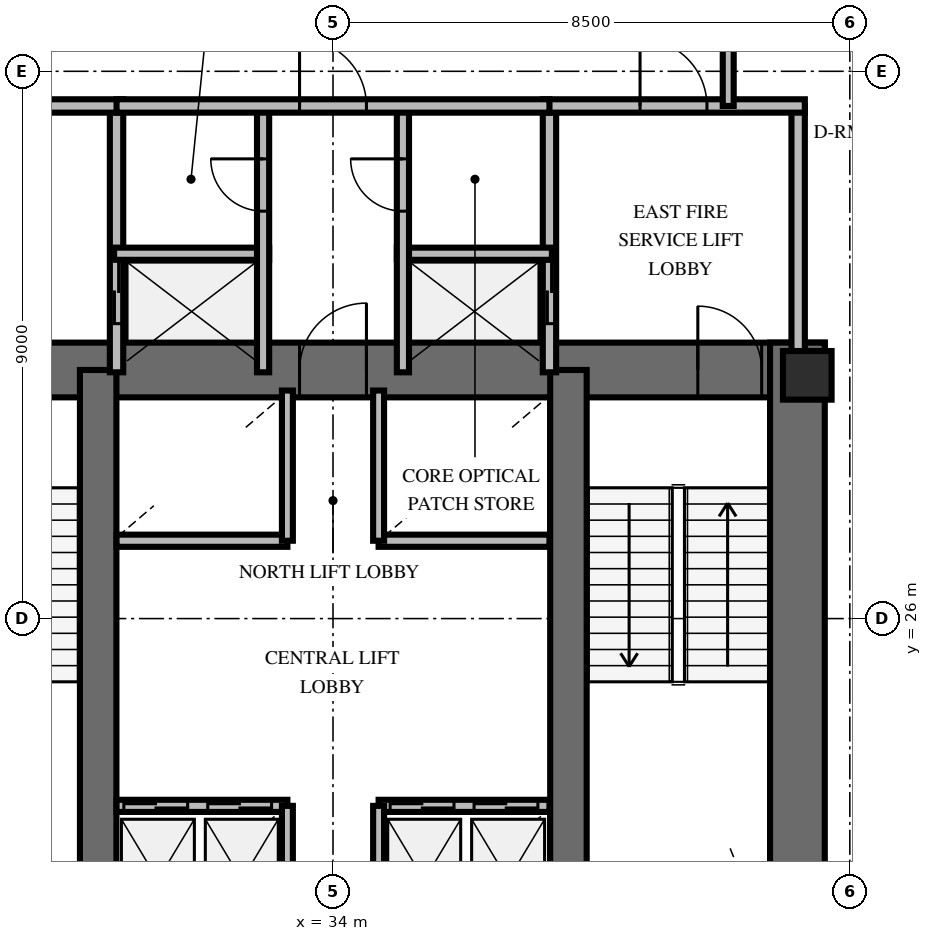
"""IFC4 building model, lengths in metres.
Left out: names, types, materials, properties, quantities, classifications, styles, units other than length and angle.
Written with IfcOpenShell. Run it as: python <this file> out.ifc"""

import sys

from ifc_helpers import new_model, si_unit, direction, frame, frame_2d, origin, origin_2d, place, context, subcontext, project, spatial, rectangle, extrude, element, fill, save


model = new_model("IFC4")
c1 = context("Model", 3, precision=1e-05, world=origin(), true_north=direction((0.0, 1.0)))
c2 = subcontext(c1, "Body", "Model", "MODEL_VIEW")
j1 = project(units=[si_unit("LENGTHUNIT", "METRE"), si_unit("PLANEANGLEUNIT", "RADIAN")], contexts=[c1])
p1 = place(None, origin())
s1 = spatial("IfcSite", under=j1, at=p1, CompositionType="ELEMENT")
p2 = place(p1, origin())
s2 = spatial("IfcBuilding", under=s1, at=p2, CompositionType="ELEMENT")
p3 = place(p2, frame((0.0, 0.0, 80.4)))
s3 = spatial("IfcBuildingStorey", under=s2, at=p3, CompositionType="ELEMENT", Elevation=80.4)
p4 = place(p3, frame((25.922, 30.088, 0.0), z_axis=(0.0, 0.0, 1.0), x_axis=(1.0, 0.0, 0.0)))
e1 = element("IfcWall", 1, at=p4, inside=s3, PredefinedType="SHEAR", context=c2, shape_type="SweptSolid", body=[
    extrude(rectangle(XDim=16.166, YDim=0.9, at=frame_2d((8.083, 0.0))), origin(), (0.0, 0.0, 1.0), 4.2),
])
p5 = place(p4, frame((1.028, 0.0, 0.0)))
e2 = element("IfcOpeningElement", 2, at=p5, cuts=e1, PredefinedType="OPENING", context=c2, shape_type="SweptSolid", body=[
    extrude(rectangle(XDim=1.05, YDim=2.15, at=frame_2d((0.525, 1.075))), frame((0.0, 0.46, 0.0), z_axis=(0.0, -1.0, 0.0), x_axis=(1.0, 0.0, 0.0)), (0.0, 0.0, 1.0), 0.92),
])
p6 = place(p4, frame((14.078, 0.0, 0.0)))
e3 = element("IfcOpeningElement", 3, at=p6, cuts=e1, PredefinedType="OPENING", context=c2, shape_type="SweptSolid", body=[
    extrude(rectangle(XDim=1.05, YDim=2.15, at=frame_2d((0.525, 1.075))), frame((0.0, 0.46, 0.0), z_axis=(0.0, -1.0, 0.0), x_axis=(1.0, 0.0, 0.0)), (0.0, 0.0, 1.0), 0.92),
])
p7 = place(p4, frame((7.528, 0.0, 0.0)))
e4 = element("IfcOpeningElement", 4, at=p7, cuts=e1, PredefinedType="OPENING", context=c2, shape_type="SweptSolid", body=[
    extrude(rectangle(XDim=1.1, YDim=2.15, at=frame_2d((0.55, 1.075))), frame((0.0, 0.46, 0.0), z_axis=(0.0, -1.0, 0.0), x_axis=(1.0, 0.0, 0.0)), (0.0, 0.0, 1.0), 0.92),
])
p8 = place(p3, frame((41.638, 19.662, 0.0), z_axis=(0.0, 0.0, 1.0), x_axis=(0.0, 1.0, 0.0)))
e5 = element("IfcWall", 5, at=p8, inside=s3, PredefinedType="SHEAR", context=c2, shape_type="SweptSolid", body=[
    extrude(rectangle(XDim=10.876, YDim=0.9, at=frame_2d((5.438, 0.0))), origin(), (0.0, 0.0, 1.0), 4.2),
])
for number, where, z_axis, x_axis in (
    (6, (30.138, 20.112, 0.0), (0.0, 0.0, 1.0), (0.0, 1.0, 0.0)),
    (7, (37.872, 20.112, 0.0), (0.0, 0.0, 1.0), (0.0, 1.0, 0.0)),
):
    element("IfcWall", number, at=place(p3, frame(where, z_axis=z_axis, x_axis=x_axis)), inside=s3, PredefinedType="SHEAR", context=c2, shape_type="SweptSolid", body=[
        extrude(rectangle(XDim=9.976, YDim=0.6, at=frame_2d((4.988, 0.0))), origin(), (0.0, 0.0, 1.0), 4.2),
    ])
p9 = place(p3, frame((41.8, 30.0, 0.0), z_axis=(0.0, 0.0, 1.0), x_axis=(1.0, 0.0, 0.0)))
e8 = element("IfcColumn", 8, at=p9, inside=s3, PredefinedType="PILASTER", context=c2, shape_type="SweptSolid", body=[
    extrude(rectangle(XDim=0.8, YDim=0.8, at=origin_2d()), origin(), (0.0, 0.0, 1.0), 4.2),
])
p10 = place(p3, frame((30.44, 30.05, 0.0), z_axis=(0.0, 0.0, 1.0), x_axis=(0.0, 1.0, 0.0)))
e9 = element("IfcWall", 9, at=p10, inside=s3, PredefinedType="SOLIDWALL", context=c2, shape_type="SweptSolid", body=[
    extrude(rectangle(XDim=4.38, YDim=0.22, at=frame_2d((2.19, 0.0))), origin(), (0.0, 0.0, 1.0), 3.0),
])
p11 = place(p10, frame((0.8, 0.0, 0.0)))
e10 = element("IfcOpeningElement", 10, at=p11, cuts=e9, PredefinedType="OPENING", context=c2, shape_type="SweptSolid", body=[
    extrude(rectangle(XDim=1.05, YDim=2.1, at=frame_2d((0.525, 1.05))), frame((0.0, 0.12, 0.0), z_axis=(0.0, -1.0, 0.0), x_axis=(1.0, 0.0, 0.0)), (0.0, 0.0, 1.0), 0.24),
])
p12 = place(p3, frame((26.24, 34.43, 0.0), z_axis=(0.0, 0.0, 1.0), x_axis=(1.0, 0.0, 0.0)))
e11 = element("IfcWall", 11, at=p12, inside=s3, PredefinedType="SOLIDWALL", context=c2, shape_type="SweptSolid", body=[
    extrude(rectangle(XDim=4.31, YDim=0.22, at=frame_2d((2.155, 0.0))), origin(), (0.0, 0.0, 1.0), 3.0),
])
p13 = place(p12, frame((1.6, 0.0, 0.0)))
e12 = element("IfcOpeningElement", 12, at=p13, cuts=e11, PredefinedType="OPENING", context=c2, shape_type="SweptSolid", body=[
    extrude(rectangle(XDim=1.1, YDim=2.15, at=frame_2d((0.55, 1.075))), frame((0.0, 0.12, 0.0), z_axis=(0.0, -1.0, 0.0), x_axis=(1.0, 0.0, 0.0)), (0.0, 0.0, 1.0), 0.24),
])
p14 = place(p3, frame((30.4, 32.0, 0.0), z_axis=(0.0, 0.0, 1.0), x_axis=(1.0, 0.0, 0.0)))
e13 = element("IfcWall", 13, at=p14, inside=s3, PredefinedType="SOLIDWALL", context=c2, shape_type="SweptSolid", body=[
    extrude(rectangle(XDim=2.55, YDim=0.2, at=frame_2d((1.275, 0.0))), origin(), (0.0, 0.0, 1.0), 3.0),
])
p15 = place(p3, frame((32.85, 30.05, 0.0), z_axis=(0.0, 0.0, 1.0), x_axis=(0.0, 1.0, 0.0)))
e14 = element("IfcWall", 14, at=p15, inside=s3, PredefinedType="SOLIDWALL", context=c2, shape_type="SweptSolid", body=[
    extrude(rectangle(XDim=4.38, YDim=0.2, at=frame_2d((2.19, 0.0))), origin(), (0.0, 0.0, 1.0), 3.0),
])
p16 = place(p15, frame((2.65, 0.0, 0.0)))
e15 = element("IfcOpeningElement", 15, at=p16, cuts=e14, PredefinedType="OPENING", context=c2, shape_type="SweptSolid", body=[
    extrude(rectangle(XDim=0.86, YDim=2.05, at=frame_2d((0.43, 1.025))), frame((0.0, 0.11, 0.0), z_axis=(0.0, -1.0, 0.0), x_axis=(1.0, 0.0, 0.0)), (0.0, 0.0, 1.0), 0.22),
])
p17 = place(p3, frame((37.56, 30.05, 0.0), z_axis=(0.0, 0.0, 1.0), x_axis=(0.0, 1.0, 0.0)))
e16 = element("IfcWall", 16, at=p17, inside=s3, PredefinedType="SOLIDWALL", context=c2, shape_type="SweptSolid", body=[
    extrude(rectangle(XDim=4.38, YDim=0.22, at=frame_2d((2.19, 0.0))), origin(), (0.0, 0.0, 1.0), 3.0),
])
p18 = place(p17, frame((0.8, 0.0, 0.0)))
e17 = element("IfcOpeningElement", 17, at=p18, cuts=e16, PredefinedType="OPENING", context=c2, shape_type="SweptSolid", body=[
    extrude(rectangle(XDim=1.05, YDim=2.1, at=frame_2d((0.525, 1.05))), frame((0.0, 0.12, 0.0), z_axis=(0.0, -1.0, 0.0), x_axis=(1.0, 0.0, 0.0)), (0.0, 0.0, 1.0), 0.24),
])
p19 = place(p3, frame((41.65, 30.05, 0.0), z_axis=(0.0, 0.0, 1.0), x_axis=(0.0, 1.0, 0.0)))
e18 = element("IfcWall", 18, at=p19, inside=s3, PredefinedType="SOLIDWALL", context=c2, shape_type="SweptSolid", body=[
    extrude(rectangle(XDim=4.38, YDim=0.22, at=frame_2d((2.19, 0.0))), origin(), (0.0, 0.0, 1.0), 3.0),
])
p20 = place(p3, frame((37.45, 34.43, 0.0), z_axis=(0.0, 0.0, 1.0), x_axis=(1.0, 0.0, 0.0)))
e19 = element("IfcWall", 19, at=p20, inside=s3, PredefinedType="SOLIDWALL", context=c2, shape_type="SweptSolid", body=[
    extrude(rectangle(XDim=4.31, YDim=0.22, at=frame_2d((2.155, 0.0))), origin(), (0.0, 0.0, 1.0), 3.0),
])
p21 = place(p20, frame((1.6, 0.0, 0.0)))
e20 = element("IfcOpeningElement", 20, at=p21, cuts=e19, PredefinedType="OPENING", context=c2, shape_type="SweptSolid", body=[
    extrude(rectangle(XDim=1.1, YDim=2.15, at=frame_2d((0.55, 1.075))), frame((0.0, 0.12, 0.0), z_axis=(0.0, -1.0, 0.0), x_axis=(1.0, 0.0, 0.0)), (0.0, 0.0, 1.0), 0.24),
])
p22 = place(p3, frame((35.05, 32.0, 0.0), z_axis=(0.0, 0.0, 1.0), x_axis=(1.0, 0.0, 0.0)))
e21 = element("IfcWall", 21, at=p22, inside=s3, PredefinedType="SOLIDWALL", context=c2, shape_type="SweptSolid", body=[
    extrude(rectangle(XDim=2.55, YDim=0.2, at=frame_2d((1.275, 0.0))), origin(), (0.0, 0.0, 1.0), 3.0),
])
p23 = place(p3, frame((35.15, 30.05, 0.0), z_axis=(0.0, 0.0, 1.0), x_axis=(0.0, 1.0, 0.0)))
e22 = element("IfcWall", 22, at=p23, inside=s3, PredefinedType="SOLIDWALL", context=c2, shape_type="SweptSolid", body=[
    extrude(rectangle(XDim=4.38, YDim=0.2, at=frame_2d((2.19, 0.0))), origin(), (0.0, 0.0, 1.0), 3.0),
])
p24 = place(p23, frame((2.65, 0.0, 0.0)))
e23 = element("IfcOpeningElement", 23, at=p24, cuts=e22, PredefinedType="OPENING", context=c2, shape_type="SweptSolid", body=[
    extrude(rectangle(XDim=0.86, YDim=2.05, at=frame_2d((0.43, 1.025))), frame((0.0, 0.11, 0.0), z_axis=(0.0, -1.0, 0.0), x_axis=(1.0, 0.0, 0.0)), (0.0, 0.0, 1.0), 0.22),
])
p25 = place(p3, frame((30.44, 34.43, 0.0), z_axis=(0.0, 0.0, 1.0), x_axis=(1.0, 0.0, 0.0)))
e24 = element("IfcWall", 24, at=p25, inside=s3, PredefinedType="SOLIDWALL", context=c2, shape_type="SweptSolid", body=[
    extrude(rectangle(XDim=7.12, YDim=0.22, at=frame_2d((3.56, 0.0))), origin(), (0.0, 0.0, 1.0), 3.0),
])
p26 = place(p25, frame((3.01, 0.0, 0.0)))
e25 = element("IfcOpeningElement", 25, at=p26, cuts=e24, PredefinedType="OPENING", context=c2, shape_type="SweptSolid", body=[
    extrude(rectangle(XDim=1.1, YDim=2.15, at=frame_2d((0.55, 1.075))), frame((0.0, 0.12, 0.0), z_axis=(0.0, -1.0, 0.0), x_axis=(1.0, 0.0, 0.0)), (0.0, 0.0, 1.0), 0.24),
])
p27 = place(p3, frame((30.44, 22.92, 0.0), z_axis=(0.0, 0.0, 1.0), x_axis=(1.0, 0.0, 0.0)))
e26 = element("IfcWall", 26, at=p27, inside=s3, PredefinedType="SOLIDWALL", context=c2, shape_type="SweptSolid", body=[
    extrude(rectangle(XDim=2.81, YDim=0.2, at=frame_2d((1.405, 0.0))), origin(), (0.0, 0.0, 1.0), 3.0),
])
p28 = place(p27, frame((0.12, 0.0, 0.0)))
e27 = element("IfcOpeningElement", 27, at=p28, cuts=e26, PredefinedType="OPENING", context=c2, shape_type="SweptSolid", body=[
    extrude(rectangle(XDim=1.05, YDim=2.1, at=frame_2d((0.525, 1.05))), frame((0.0, 0.11, 0.0), z_axis=(0.0, -1.0, 0.0), x_axis=(1.0, 0.0, 0.0)), (0.0, 0.0, 1.0), 0.22),
])
p29 = place(p27, frame((1.5, 0.0, 0.0)))
e28 = element("IfcOpeningElement", 28, at=p29, cuts=e26, PredefinedType="OPENING", context=c2, shape_type="SweptSolid", body=[
    extrude(rectangle(XDim=1.05, YDim=2.1, at=frame_2d((0.525, 1.05))), frame((0.0, 0.11, 0.0), z_axis=(0.0, -1.0, 0.0), x_axis=(1.0, 0.0, 0.0)), (0.0, 0.0, 1.0), 0.22),
])
p30 = place(p3, frame((33.25, 20.5, 0.0), z_axis=(0.0, 0.0, 1.0), x_axis=(0.0, 1.0, 0.0)))
e29 = element("IfcWall", 29, at=p30, inside=s3, PredefinedType="SOLIDWALL", context=c2, shape_type="SweptSolid", body=[
    extrude(rectangle(XDim=2.42, YDim=0.18, at=frame_2d((1.21, 0.0))), origin(), (0.0, 0.0, 1.0), 3.0),
])
p31 = place(p3, frame((34.75, 22.92, 0.0), z_axis=(0.0, 0.0, 1.0), x_axis=(1.0, 0.0, 0.0)))
e30 = element("IfcWall", 30, at=p31, inside=s3, PredefinedType="SOLIDWALL", context=c2, shape_type="SweptSolid", body=[
    extrude(rectangle(XDim=2.81, YDim=0.2, at=frame_2d((1.405, 0.0))), origin(), (0.0, 0.0, 1.0), 3.0),
])
p32 = place(p31, frame((0.19, 0.0, 0.0)))
e31 = element("IfcOpeningElement", 31, at=p32, cuts=e30, PredefinedType="OPENING", context=c2, shape_type="SweptSolid", body=[
    extrude(rectangle(XDim=1.05, YDim=2.1, at=frame_2d((0.525, 1.05))), frame((0.0, 0.11, 0.0), z_axis=(0.0, -1.0, 0.0), x_axis=(1.0, 0.0, 0.0)), (0.0, 0.0, 1.0), 0.22),
])
p33 = place(p31, frame((1.57, 0.0, 0.0)))
e32 = element("IfcOpeningElement", 32, at=p33, cuts=e30, PredefinedType="OPENING", context=c2, shape_type="SweptSolid", body=[
    extrude(rectangle(XDim=1.05, YDim=2.1, at=frame_2d((0.525, 1.05))), frame((0.0, 0.11, 0.0), z_axis=(0.0, -1.0, 0.0), x_axis=(1.0, 0.0, 0.0)), (0.0, 0.0, 1.0), 0.22),
])
p34 = place(p3, frame((34.75, 20.5, 0.0), z_axis=(0.0, 0.0, 1.0), x_axis=(0.0, 1.0, 0.0)))
e33 = element("IfcWall", 33, at=p34, inside=s3, PredefinedType="SOLIDWALL", context=c2, shape_type="SweptSolid", body=[
    extrude(rectangle(XDim=2.42, YDim=0.18, at=frame_2d((1.21, 0.0))), origin(), (0.0, 0.0, 1.0), 3.0),
])
p35 = place(p3, frame((30.44, 27.28, 0.0), z_axis=(0.0, 0.0, 1.0), x_axis=(1.0, 0.0, 0.0)))
e34 = element("IfcWall", 34, at=p35, inside=s3, PredefinedType="SOLIDWALL", context=c2, shape_type="SweptSolid", body=[
    extrude(rectangle(XDim=2.81, YDim=0.2, at=frame_2d((1.405, 0.0))), origin(), (0.0, 0.0, 1.0), 3.0),
])
p36 = place(p3, frame((33.25, 27.28, 0.0), z_axis=(0.0, 0.0, 1.0), x_axis=(0.0, 1.0, 0.0)))
e35 = element("IfcWall", 35, at=p36, inside=s3, PredefinedType="SOLIDWALL", context=c2, shape_type="SweptSolid", body=[
    extrude(rectangle(XDim=2.47, YDim=0.18, at=frame_2d((1.235, 0.0))), origin(), (0.0, 0.0, 1.0), 3.0),
])
p37 = place(p3, frame((34.75, 27.28, 0.0), z_axis=(0.0, 0.0, 1.0), x_axis=(1.0, 0.0, 0.0)))
e36 = element("IfcWall", 36, at=p37, inside=s3, PredefinedType="SOLIDWALL", context=c2, shape_type="SweptSolid", body=[
    extrude(rectangle(XDim=2.81, YDim=0.2, at=frame_2d((1.405, 0.0))), origin(), (0.0, 0.0, 1.0), 3.0),
])
p38 = place(p3, frame((34.75, 27.28, 0.0), z_axis=(0.0, 0.0, 1.0), x_axis=(0.0, 1.0, 0.0)))
e37 = element("IfcWall", 37, at=p38, inside=s3, PredefinedType="SOLIDWALL", context=c2, shape_type="SweptSolid", body=[
    extrude(rectangle(XDim=2.47, YDim=0.18, at=frame_2d((1.235, 0.0))), origin(), (0.0, 0.0, 1.0), 3.0),
])
p39 = place(p3, frame((40.5, 36.123, 0.0), z_axis=(0.0, 0.0, 1.0), x_axis=(0.0, -1.0, 0.0)))
e38 = element("IfcWall", 38, at=p39, inside=s3, PredefinedType="PARTITIONING", context=c2, shape_type="SweptSolid", body=[
    extrude(rectangle(XDim=1.693, YDim=0.18, at=frame_2d((0.846, 0.0))), origin(), (0.0, 0.0, 1.0), 3.0),
])
p40 = place(p6, origin())
e39 = element("IfcDoor", 39, at=p40, inside=s3, OperationType="SINGLE_SWING_LEFT", PredefinedType="DOOR", context=c2, shape_type="SweptSolid", body=[
    extrude(rectangle(XDim=1.05, YDim=2.15, at=frame_2d((0.525, 1.075))), frame((0.0, 0.025, 0.0), z_axis=(0.0, -1.0, 0.0), x_axis=(1.0, 0.0, 0.0)), (0.0, 0.0, 1.0), 0.05),
])
fill(e3, e39)
p41 = place(p7, origin())
e40 = element("IfcDoor", 40, at=p41, inside=s3, OperationType="SINGLE_SWING_RIGHT", PredefinedType="DOOR", context=c2, shape_type="SweptSolid", body=[
    extrude(rectangle(XDim=1.1, YDim=2.15, at=frame_2d((0.55, 1.075))), frame((0.0, 0.025, 0.0), z_axis=(0.0, -1.0, 0.0), x_axis=(1.0, 0.0, 0.0)), (0.0, 0.0, 1.0), 0.05),
])
fill(e4, e40)
p42 = place(p11, origin())
e41 = element("IfcDoor", 41, at=p42, inside=s3, OperationType="DOUBLE_DOOR_SLIDING", PredefinedType="USERDEFINED", context=c2, shape_type="SweptSolid", body=[
    extrude(rectangle(XDim=1.05, YDim=2.1, at=frame_2d((0.525, 1.05))), frame((0.0, 0.025, 0.0), z_axis=(0.0, -1.0, 0.0), x_axis=(1.0, 0.0, 0.0)), (0.0, 0.0, 1.0), 0.05),
])
fill(e10, e41)
p43 = place(p16, origin())
e42 = element("IfcDoor", 42, at=p43, inside=s3, OperationType="SINGLE_SWING_RIGHT", PredefinedType="TRAPDOOR", context=c2, shape_type="SweptSolid", body=[
    extrude(rectangle(XDim=0.86, YDim=2.05, at=frame_2d((0.43, 1.025))), frame((0.0, 0.025, 0.0), z_axis=(0.0, -1.0, 0.0), x_axis=(1.0, 0.0, 0.0)), (0.0, 0.0, 1.0), 0.05),
])
fill(e15, e42)
p44 = place(p21, origin())
e43 = element("IfcDoor", 43, at=p44, inside=s3, OperationType="SINGLE_SWING_LEFT", PredefinedType="DOOR", context=c2, shape_type="SweptSolid", body=[
    extrude(rectangle(XDim=1.1, YDim=2.15, at=frame_2d((0.55, 1.075))), frame((0.0, 0.025, 0.0), z_axis=(0.0, -1.0, 0.0), x_axis=(1.0, 0.0, 0.0)), (0.0, 0.0, 1.0), 0.05),
])
fill(e20, e43)
p45 = place(p18, origin())
e44 = element("IfcDoor", 44, at=p45, inside=s3, OperationType="DOUBLE_DOOR_SLIDING", PredefinedType="USERDEFINED", context=c2, shape_type="SweptSolid", body=[
    extrude(rectangle(XDim=1.05, YDim=2.1, at=frame_2d((0.525, 1.05))), frame((0.0, 0.025, 0.0), z_axis=(0.0, -1.0, 0.0), x_axis=(1.0, 0.0, 0.0)), (0.0, 0.0, 1.0), 0.05),
])
fill(e17, e44)
p46 = place(p24, origin())
e45 = element("IfcDoor", 45, at=p46, inside=s3, OperationType="SINGLE_SWING_RIGHT", PredefinedType="TRAPDOOR", context=c2, shape_type="SweptSolid", body=[
    extrude(rectangle(XDim=0.86, YDim=2.05, at=frame_2d((0.43, 1.025))), frame((0.0, 0.025, 0.0), z_axis=(0.0, -1.0, 0.0), x_axis=(1.0, 0.0, 0.0)), (0.0, 0.0, 1.0), 0.05),
])
fill(e23, e45)
p47 = place(p26, origin())
e46 = element("IfcDoor", 46, at=p47, inside=s3, OperationType="SINGLE_SWING_LEFT", PredefinedType="DOOR", context=c2, shape_type="SweptSolid", body=[
    extrude(rectangle(XDim=1.1, YDim=2.15, at=frame_2d((0.55, 1.075))), frame((0.0, 0.025, 0.0), z_axis=(0.0, -1.0, 0.0), x_axis=(1.0, 0.0, 0.0)), (0.0, 0.0, 1.0), 0.05),
])
fill(e25, e46)
p48 = place(p28, origin())
e47 = element("IfcDoor", 47, at=p48, inside=s3, OperationType="DOUBLE_DOOR_SLIDING", PredefinedType="USERDEFINED", context=c2, shape_type="SweptSolid", body=[
    extrude(rectangle(XDim=1.05, YDim=2.1, at=frame_2d((0.525, 1.05))), frame((0.0, 0.025, 0.0), z_axis=(0.0, -1.0, 0.0), x_axis=(1.0, 0.0, 0.0)), (0.0, 0.0, 1.0), 0.05),
])
fill(e27, e47)
p49 = place(p29, origin())
e48 = element("IfcDoor", 48, at=p49, inside=s3, OperationType="DOUBLE_DOOR_SLIDING", PredefinedType="USERDEFINED", context=c2, shape_type="SweptSolid", body=[
    extrude(rectangle(XDim=1.05, YDim=2.1, at=frame_2d((0.525, 1.05))), frame((0.0, 0.025, 0.0), z_axis=(0.0, -1.0, 0.0), x_axis=(1.0, 0.0, 0.0)), (0.0, 0.0, 1.0), 0.05),
])
fill(e28, e48)
p50 = place(p32, origin())
e49 = element("IfcDoor", 49, at=p50, inside=s3, OperationType="DOUBLE_DOOR_SLIDING", PredefinedType="USERDEFINED", context=c2, shape_type="SweptSolid", body=[
    extrude(rectangle(XDim=1.05, YDim=2.1, at=frame_2d((0.525, 1.05))), frame((0.0, 0.025, 0.0), z_axis=(0.0, -1.0, 0.0), x_axis=(1.0, 0.0, 0.0)), (0.0, 0.0, 1.0), 0.05),
])
fill(e31, e49)
p51 = place(p33, origin())
e50 = element("IfcDoor", 50, at=p51, inside=s3, OperationType="DOUBLE_DOOR_SLIDING", PredefinedType="USERDEFINED", context=c2, shape_type="SweptSolid", body=[
    extrude(rectangle(XDim=1.05, YDim=2.1, at=frame_2d((0.525, 1.05))), frame((0.0, 0.025, 0.0), z_axis=(0.0, -1.0, 0.0), x_axis=(1.0, 0.0, 0.0)), (0.0, 0.0, 1.0), 0.05),
])
fill(e32, e50)
save(model, sys.argv[1])
